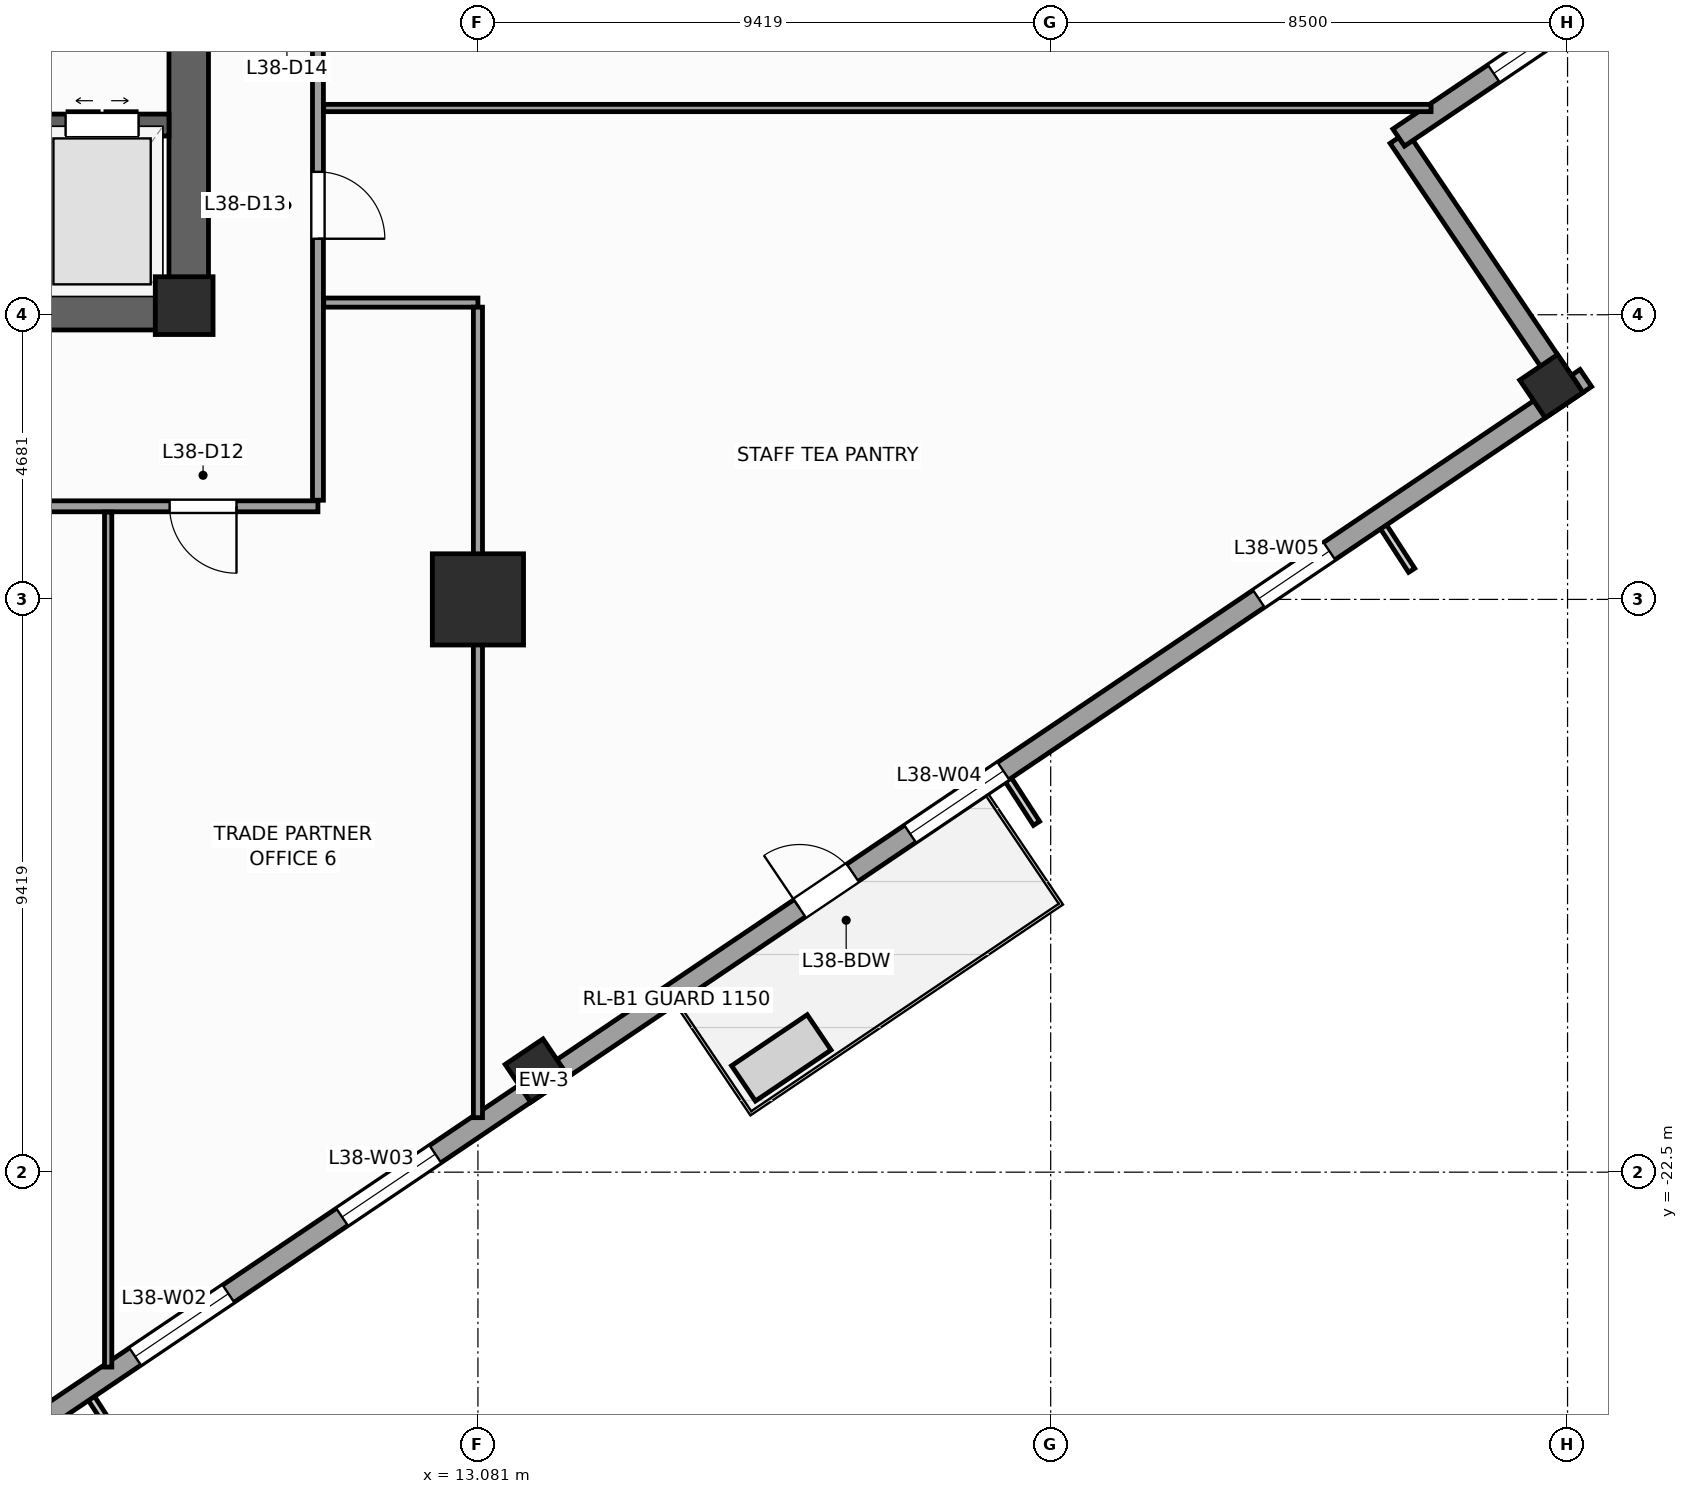
"""IFC4 building model, lengths in metres.
Left out: names, types, materials, properties, quantities, classifications, styles, units other than length and angle.
Written with IfcOpenShell. Run it as: python <this file> out.ifc"""

import sys

from ifc_helpers import new_model, si_unit, direction, frame, frame_2d, origin, origin_2d, place, context, subcontext, project, spatial, rectangle, extrude, source, transform, mapped, element, fill, save


model = new_model("IFC4")
c1 = context("Model", 3, precision=1e-05, world=origin(), true_north=direction((0.0, 1.0)))
c2 = subcontext(c1, "Body", "Model", "MODEL_VIEW")
j1 = project(units=[si_unit("LENGTHUNIT", "METRE"), si_unit("PLANEANGLEUNIT", "RADIAN")], contexts=[c1])
p1 = place(None, origin())
s1 = spatial("IfcSite", under=j1, at=p1, CompositionType="ELEMENT")
p2 = place(p1, origin())
s2 = spatial("IfcBuilding", under=s1, at=p2, CompositionType="ELEMENT")
p3 = place(p2, frame((0.0, 0.0, 160.4)))
s3 = spatial("IfcBuildingStorey", under=s2, at=p3, CompositionType="ELEMENT", Elevation=160.4)
p4 = place(p3, frame((-8.65, -8.325, 0.0), z_axis=(0.0, 0.0, 1.0), x_axis=(1.0, 0.0, 0.0)))
e1 = element("IfcWall", 1, at=p4, inside=s3, PredefinedType="SHEAR", context=c2, shape_type="SweptSolid", body=[
    extrude(rectangle(XDim=17.3, YDim=0.65, at=frame_2d((8.65, 0.0))), origin(), (0.0, 0.0, 1.0), 4.0),
])
p5 = place(p4, frame((8.0, 0.0, 0.0)))
e2 = element("IfcOpeningElement", 2, at=p5, cuts=e1, PredefinedType="OPENING", context=c2, shape_type="SweptSolid", body=[
    extrude(rectangle(XDim=1.3, YDim=2.2, at=frame_2d((0.65, 1.1))), frame((0.0, 0.335, 0.0), z_axis=(0.0, -1.0, 0.0), x_axis=(1.0, 0.0, 0.0)), (0.0, 0.0, 1.0), 0.67),
])
p6 = place(p3, frame((8.325, -8.0, 0.0), z_axis=(0.0, 0.0, 1.0), x_axis=(0.0, 1.0, 0.0)))
e3 = element("IfcWall", 3, at=p6, inside=s3, PredefinedType="SHEAR", context=c2, shape_type="SweptSolid", body=[
    extrude(rectangle(XDim=16.0, YDim=0.65, at=frame_2d((8.0, 0.0))), origin(), (0.0, 0.0, 1.0), 4.0),
])
p7 = place(p6, frame((4.69, 0.0, 0.0)))
e4 = element("IfcOpeningElement", 4, at=p7, cuts=e3, PredefinedType="OPENING", context=c2, shape_type="SweptSolid", body=[
    extrude(rectangle(XDim=1.3, YDim=2.2, at=frame_2d((0.65, 1.1))), frame((0.0, 0.335, 0.0), z_axis=(0.0, -1.0, 0.0), x_axis=(1.0, 0.0, 0.0)), (0.0, 0.0, 1.0), 0.67),
])
p8 = place(p3, frame((4.54, -5.28, 0.0), z_axis=(0.0, 0.0, 1.0), x_axis=(1.0, 0.0, 0.0)))
e5 = element("IfcWall", 5, at=p8, inside=s3, PredefinedType="SHEAR", context=c2, shape_type="SweptSolid", body=[
    extrude(rectangle(XDim=3.46, YDim=0.36, at=frame_2d((1.73, 0.0))), origin(), (0.0, 0.0, 1.0), 4.0),
])
p9 = place(p8, frame((1.76, 0.0, 0.0)))
e6 = element("IfcOpeningElement", 6, at=p9, cuts=e5, PredefinedType="OPENING", context=c2, shape_type="SweptSolid", body=[
    extrude(rectangle(XDim=1.2, YDim=2.25, at=frame_2d((0.6, 1.125))), frame((0.0, 0.19, 0.0), z_axis=(0.0, -1.0, 0.0), x_axis=(1.0, 0.0, 0.0)), (0.0, 0.0, 1.0), 0.38),
])
m1 = source(origin(), c2, "Body", "SweptSolid", [
    extrude(rectangle(XDim=0.95, YDim=0.95, at=origin_2d()), origin(), (0.0, 0.0, 1.0), 4.0),
])
p10 = place(p3, frame((8.25, -8.25, 0.0), z_axis=(0.0, 0.0, 1.0), x_axis=(1.0, 0.0, 0.0)))
e7 = element("IfcColumn", 7, at=p10, inside=s3, PredefinedType="PILASTER", context=c2, shape_type="MappedRepresentation", body=[
    mapped(m1, transform((0.0, 0.0, 0.0), scale=1.0)),
])
m2 = source(origin(), c2, "Body", "SweptSolid", [
    extrude(rectangle(XDim=1.5, YDim=1.5, at=origin_2d()), origin(), (0.0, 0.0, 1.0), 4.0),
])
p11 = place(p3, frame((13.081, -13.081, 0.0), z_axis=(0.0, 0.0, 1.0), x_axis=(1.0, 0.0, 0.0)))
e8 = element("IfcColumn", 8, at=p11, inside=s3, PredefinedType="COLUMN", context=c2, shape_type="MappedRepresentation", body=[
    mapped(m2, transform((0.0, 0.0, 0.0), scale=1.0)),
])
m3 = source(origin(), c2, "Body", "SweptSolid", [
    extrude(rectangle(XDim=0.75, YDim=0.75, at=origin_2d()), origin(), (0.0, 0.0, 1.0), 4.0),
])
for number, where, z_axis, x_axis in (
    (9, (14.05, -20.83, 0.0), (0.0, 0.0, 1.0), (0.829, 0.559, 0.0)),
    (10, (30.734, -9.576, 0.0), (0.0, 0.0, 1.0), (0.829, 0.559, 0.0)),
):
    element("IfcColumn", number, at=place(p3, frame(where, z_axis=z_axis, x_axis=x_axis)), inside=s3, PredefinedType="COLUMN", context=c2, shape_type="MappedRepresentation", body=[
        mapped(m3, transform((0.0, 0.0, 0.0), scale=1.0)),
    ])
p12 = place(p3, frame((-2.972, -32.558, 0.0), z_axis=(0.0, 0.0, 1.0), x_axis=(0.829036218961, 0.559194910251, 0.0)))
e11 = element("IfcWall", 11, at=p12, inside=s3, PredefinedType="STANDARD", context=c2, shape_type="SweptSolid", body=[
    extrude(rectangle(XDim=41.34, YDim=0.34, at=frame_2d((20.67, 0.0))), origin(), (0.0, 0.0, 1.0), 3.04),
])
p13 = place(p12, frame((25.745, 0.0, 0.0)))
e12 = element("IfcOpeningElement", 12, at=p13, cuts=e11, PredefinedType="OPENING", context=c2, shape_type="SweptSolid", body=[
    extrude(rectangle(XDim=1.05, YDim=2.25, at=frame_2d((0.525, 1.125))), frame((0.0, 0.18, 0.0), z_axis=(0.0, -1.0, 0.0), x_axis=(1.0, 0.0, 0.0)), (0.0, 0.0, 1.0), 0.36),
])
p14 = place(p12, frame((4.261, 0.0, 0.56)))
e13 = element("IfcOpeningElement", 13, at=p14, cuts=e11, PredefinedType="OPENING", context=c2, shape_type="SweptSolid", body=[
    extrude(rectangle(XDim=1.4, YDim=2.4, at=frame_2d((0.7, 1.2))), frame((0.0, 0.18, 0.0), z_axis=(0.0, -1.0, 0.0), x_axis=(1.0, 0.0, 0.0)), (0.0, 0.0, 1.0), 0.36),
])
p15 = place(p12, frame((12.564, 0.0, 0.61)))
e14 = element("IfcOpeningElement", 14, at=p15, cuts=e11, PredefinedType="OPENING", context=c2, shape_type="SweptSolid", body=[
    extrude(rectangle(XDim=1.85, YDim=2.35, at=frame_2d((0.925, 1.175))), frame((0.0, 0.18, 0.0), z_axis=(0.0, -1.0, 0.0), x_axis=(1.0, 0.0, 0.0)), (0.0, 0.0, 1.0), 0.36),
])
p16 = place(p12, frame((16.668, 0.0, 0.61)))
e15 = element("IfcOpeningElement", 15, at=p16, cuts=e11, PredefinedType="OPENING", context=c2, shape_type="SweptSolid", body=[
    extrude(rectangle(XDim=1.85, YDim=2.35, at=frame_2d((0.925, 1.175))), frame((0.0, 0.18, 0.0), z_axis=(0.0, -1.0, 0.0), x_axis=(1.0, 0.0, 0.0)), (0.0, 0.0, 1.0), 0.36),
])
p17 = place(p12, frame((27.936, 0.0, 0.61)))
e16 = element("IfcOpeningElement", 16, at=p17, cuts=e11, PredefinedType="OPENING", context=c2, shape_type="SweptSolid", body=[
    extrude(rectangle(XDim=1.85, YDim=2.35, at=frame_2d((0.925, 1.175))), frame((0.0, 0.18, 0.0), z_axis=(0.0, -1.0, 0.0), x_axis=(1.0, 0.0, 0.0)), (0.0, 0.0, 1.0), 0.36),
])
p18 = place(p12, frame((34.852, 0.0, 0.56)))
e17 = element("IfcOpeningElement", 17, at=p18, cuts=e11, PredefinedType="OPENING", context=c2, shape_type="SweptSolid", body=[
    extrude(rectangle(XDim=1.4, YDim=2.4, at=frame_2d((0.7, 1.2))), frame((0.0, 0.18, 0.0), z_axis=(0.0, -1.0, 0.0), x_axis=(1.0, 0.0, 0.0)), (0.0, 0.0, 1.0), 0.36),
])
p19 = place(p3, frame((31.019, -9.631, 0.0), z_axis=(0.0, 0.0, 1.0), x_axis=(-0.559210350234, 0.829025804298, 0.0)))
e18 = element("IfcWall", 18, at=p19, inside=s3, PredefinedType="STANDARD", context=c2, shape_type="SweptSolid", body=[
    extrude(rectangle(XDim=5.0, YDim=0.34, at=frame_2d((2.5, 0.0))), origin(), (0.0, 0.0, 1.0), 3.74),
])
p20 = place(p3, frame((28.223, -5.486, 0.0), z_axis=(0.0, 0.0, 1.0), x_axis=(0.82905227345, 0.559171107879, 0.0)))
e19 = element("IfcWall", 19, at=p20, inside=s3, PredefinedType="STANDARD", context=c2, shape_type="SweptSolid", body=[
    extrude(rectangle(XDim=5.17, YDim=0.34, at=frame_2d((2.585, 0.0))), origin(), (0.0, 0.0, 1.0), 3.04),
])
p21 = place(p20, frame((1.885, 0.0, 0.56)))
e20 = element("IfcOpeningElement", 20, at=p21, cuts=e19, PredefinedType="OPENING", context=c2, shape_type="SweptSolid", body=[
    extrude(rectangle(XDim=1.4, YDim=2.4, at=frame_2d((0.7, 1.2))), frame((0.0, 0.18, 0.0), z_axis=(0.0, -1.0, 0.0), x_axis=(1.0, 0.0, 0.0)), (0.0, 0.0, 1.0), 0.36),
])
p22 = place(p3, frame((-11.55, -11.55, 0.0), z_axis=(0.0, 0.0, 1.0), x_axis=(1.0, 0.0, 0.0)))
e21 = element("IfcWall", 21, at=p22, inside=s3, PredefinedType="PARTITIONING", context=c2, shape_type="SweptSolid", body=[
    extrude(rectangle(XDim=22.0, YDim=0.18, at=frame_2d((11.0, 0.0))), origin(), (0.0, 0.0, 1.0), 3.74),
])
p23 = place(p22, frame((1.58, 0.0, 0.0)))
e22 = element("IfcOpeningElement", 22, at=p23, cuts=e21, PredefinedType="OPENING", context=c2, shape_type="SweptSolid", body=[
    extrude(rectangle(XDim=0.95, YDim=2.1, at=frame_2d((0.475, 1.05))), frame((0.0, 0.1, 0.0), z_axis=(0.0, -1.0, 0.0), x_axis=(1.0, 0.0, 0.0)), (0.0, 0.0, 1.0), 0.2),
])
p24 = place(p22, frame((6.75, 0.0, 0.0)))
e23 = element("IfcOpeningElement", 23, at=p24, cuts=e21, PredefinedType="OPENING", context=c2, shape_type="SweptSolid", body=[
    extrude(rectangle(XDim=1.1, YDim=2.2, at=frame_2d((0.55, 1.1))), frame((0.0, 0.1, 0.0), z_axis=(0.0, -1.0, 0.0), x_axis=(1.0, 0.0, 0.0)), (0.0, 0.0, 1.0), 0.2),
])
p25 = place(p22, frame((11.25, 0.0, 0.0)))
e24 = element("IfcOpeningElement", 24, at=p25, cuts=e21, PredefinedType="OPENING", context=c2, shape_type="SweptSolid", body=[
    extrude(rectangle(XDim=1.1, YDim=2.2, at=frame_2d((0.55, 1.1))), frame((0.0, 0.1, 0.0), z_axis=(0.0, -1.0, 0.0), x_axis=(1.0, 0.0, 0.0)), (0.0, 0.0, 1.0), 0.2),
])
p26 = place(p22, frame((15.75, 0.0, 0.0)))
e25 = element("IfcOpeningElement", 25, at=p26, cuts=e21, PredefinedType="OPENING", context=c2, shape_type="SweptSolid", body=[
    extrude(rectangle(XDim=1.1, YDim=2.2, at=frame_2d((0.55, 1.1))), frame((0.0, 0.1, 0.0), z_axis=(0.0, -1.0, 0.0), x_axis=(1.0, 0.0, 0.0)), (0.0, 0.0, 1.0), 0.2),
])
p27 = place(p22, frame((19.561, 0.0, 0.0)))
e26 = element("IfcOpeningElement", 26, at=p27, cuts=e21, PredefinedType="OPENING", context=c2, shape_type="SweptSolid", body=[
    extrude(rectangle(XDim=1.1, YDim=2.2, at=frame_2d((0.55, 1.1))), frame((0.0, 0.1, 0.0), z_axis=(0.0, -1.0, 0.0), x_axis=(1.0, 0.0, 0.0)), (0.0, 0.0, 1.0), 0.2),
])
p28 = place(p3, frame((10.45, -11.45, 0.0), z_axis=(0.0, 0.0, 1.0), x_axis=(0.0, 1.0, 0.0)))
e27 = element("IfcWall", 27, at=p28, inside=s3, PredefinedType="PARTITIONING", context=c2, shape_type="SweptSolid", body=[
    extrude(rectangle(XDim=10.05, YDim=0.18, at=frame_2d((5.025, 0.0))), origin(), (0.0, 0.0, 1.0), 3.74),
])
p29 = place(p28, frame((4.3, 0.0, 0.0)))
e28 = element("IfcOpeningElement", 28, at=p29, cuts=e27, PredefinedType="OPENING", context=c2, shape_type="SweptSolid", body=[
    extrude(rectangle(XDim=1.1, YDim=2.2, at=frame_2d((0.55, 1.1))), frame((0.0, 0.1, 0.0), z_axis=(0.0, -1.0, 0.0), x_axis=(1.0, 0.0, 0.0)), (0.0, 0.0, 1.0), 0.2),
])
p30 = place(p28, frame((7.536, 0.0, 0.0)))
e29 = element("IfcOpeningElement", 29, at=p30, cuts=e27, PredefinedType="OPENING", context=c2, shape_type="SweptSolid", body=[
    extrude(rectangle(XDim=1.1, YDim=2.2, at=frame_2d((0.55, 1.1))), frame((0.0, 0.1, 0.0), z_axis=(0.0, -1.0, 0.0), x_axis=(1.0, 0.0, 0.0)), (0.0, 0.0, 1.0), 0.2),
])
p31 = place(p3, frame((7.0, -25.705, 0.0), z_axis=(0.0, 0.0, 1.0), x_axis=(0.0, 1.0, 0.0)))
e30 = element("IfcWall", 30, at=p31, inside=s3, PredefinedType="PARTITIONING", context=c2, shape_type="SweptSolid", body=[
    extrude(rectangle(XDim=14.06, YDim=0.12, at=frame_2d((7.03, 0.0))), origin(), (0.0, 0.0, 1.0), 3.74),
])
p32 = place(p3, frame((10.545, -8.2, 0.0), z_axis=(0.0, 0.0, 1.0), x_axis=(1.0, 0.0, 0.0)))
e31 = element("IfcWall", 31, at=p32, inside=s3, PredefinedType="PARTITIONING", context=c2, shape_type="SweptSolid", body=[
    extrude(rectangle(XDim=2.536, YDim=0.15, at=frame_2d((1.268, 0.0))), origin(), (0.0, 0.0, 1.0), 3.74),
])
p33 = place(p3, frame((13.081, -8.275, 0.0), z_axis=(0.0, 0.0, 1.0), x_axis=(0.0, -1.0, 0.0)))
e32 = element("IfcWall", 32, at=p33, inside=s3, PredefinedType="PARTITIONING", context=c2, shape_type="SweptSolid", body=[
    extrude(rectangle(XDim=13.329, YDim=0.15, at=frame_2d((6.664, 0.0))), origin(), (0.0, 0.0, 1.0), 2.84),
])
p34 = place(p3, frame((10.545, -5.0, 0.0), z_axis=(0.0, 0.0, 1.0), x_axis=(1.0, 0.0, 0.0)))
e33 = element("IfcWall", 33, at=p34, inside=s3, PredefinedType="PARTITIONING", context=c2, shape_type="SweptSolid", body=[
    extrude(rectangle(XDim=18.21, YDim=0.12, at=frame_2d((9.105, 0.0))), origin(), (0.0, 0.0, 1.0), 3.74),
])
m4 = source(origin(), c2, "Body", "SweptSolid", [
    extrude(rectangle(XDim=1.05, YDim=2.25, at=frame_2d((0.525, 1.125))), frame((0.0, 0.025, 0.0), z_axis=(0.0, -1.0, 0.0), x_axis=(1.0, 0.0, 0.0)), (0.0, 0.0, 1.0), 0.05),
])
p35 = place(p13, origin())
e34 = element("IfcDoor", 34, at=p35, inside=s3, OperationType="SINGLE_SWING_LEFT", PredefinedType="DOOR", context=c2, shape_type="MappedRepresentation", body=[
    mapped(m4, transform((0.0, 0.0, 0.0), scale=1.0)),
])
fill(e12, e34)
m5 = source(origin(), c2, "Body", "SweptSolid", [
    extrude(rectangle(XDim=1.85, YDim=2.35, at=frame_2d((0.925, 1.175))), frame((0.0, 0.03, 0.0), z_axis=(0.0, -1.0, 0.0), x_axis=(1.0, 0.0, 0.0)), (0.0, 0.0, 1.0), 0.06),
])
p36 = place(p15, origin())
e35 = element("IfcWindow", 35, at=p36, inside=s3, PartitioningType="SINGLE_PANEL", PredefinedType="WINDOW", context=c2, shape_type="MappedRepresentation", body=[
    mapped(m5, transform((0.0, 0.0, 0.0), scale=1.0)),
])
fill(e14, e35)
p37 = place(p16, origin())
e36 = element("IfcWindow", 36, at=p37, inside=s3, PartitioningType="SINGLE_PANEL", PredefinedType="WINDOW", context=c2, shape_type="MappedRepresentation", body=[
    mapped(m5, transform((0.0, 0.0, 0.0), scale=1.0)),
])
fill(e15, e36)
p38 = place(p17, origin())
e37 = element("IfcWindow", 37, at=p38, inside=s3, PartitioningType="SINGLE_PANEL", PredefinedType="WINDOW", context=c2, shape_type="MappedRepresentation", body=[
    mapped(m5, transform((0.0, 0.0, 0.0), scale=1.0)),
])
fill(e16, e37)
m6 = source(origin(), c2, "Body", "SweptSolid", [
    extrude(rectangle(XDim=1.4, YDim=2.4, at=frame_2d((0.7, 1.2))), frame((0.0, 0.03, 0.0), z_axis=(0.0, -1.0, 0.0), x_axis=(1.0, 0.0, 0.0)), (0.0, 0.0, 1.0), 0.06),
])
p39 = place(p18, origin())
e38 = element("IfcWindow", 38, at=p39, inside=s3, PartitioningType="SINGLE_PANEL", PredefinedType="WINDOW", context=c2, shape_type="MappedRepresentation", body=[
    mapped(m6, transform((0.0, 0.0, 0.0), scale=1.0)),
])
fill(e17, e38)
p40 = place(p21, origin())
e39 = element("IfcWindow", 39, at=p40, inside=s3, PartitioningType="SINGLE_PANEL", PredefinedType="WINDOW", context=c2, shape_type="MappedRepresentation", body=[
    mapped(m6, transform((0.0, 0.0, 0.0), scale=1.0)),
])
fill(e20, e39)
m7 = source(origin(), c2, "Body", "SweptSolid", [
    extrude(rectangle(XDim=1.2, YDim=2.25, at=frame_2d((0.6, 1.125))), frame((0.0, 0.025, 0.0), z_axis=(0.0, -1.0, 0.0), x_axis=(1.0, 0.0, 0.0)), (0.0, 0.0, 1.0), 0.05),
])
p41 = place(p9, origin())
e40 = element("IfcDoor", 40, at=p41, inside=s3, OperationType="DOUBLE_DOOR_SLIDING", PredefinedType="DOOR", context=c2, shape_type="MappedRepresentation", body=[
    mapped(m7, transform((0.0, 0.0, 0.0), scale=1.0)),
])
fill(e6, e40)
m8 = source(origin(), c2, "Body", "SweptSolid", [
    extrude(rectangle(XDim=1.1, YDim=2.2, at=frame_2d((0.55, 1.1))), frame((0.0, 0.025, 0.0), z_axis=(0.0, -1.0, 0.0), x_axis=(1.0, 0.0, 0.0)), (0.0, 0.0, 1.0), 0.05),
])
p42 = place(p27, frame((1.1, 0.0, 0.0), z_axis=(0.0, 0.0, 1.0), x_axis=(-1.0, 0.0, 0.0)))
e41 = element("IfcDoor", 41, at=p42, inside=s3, OperationType="SINGLE_SWING_RIGHT", PredefinedType="DOOR", context=c2, shape_type="MappedRepresentation", body=[
    mapped(m8, transform((0.0, 0.0, 0.0), scale=1.0)),
])
fill(e26, e41)
p43 = place(p29, frame((1.1, 0.0, 0.0), z_axis=(0.0, 0.0, 1.0), x_axis=(-1.0, 0.0, 0.0)))
e42 = element("IfcDoor", 42, at=p43, inside=s3, OperationType="SINGLE_SWING_LEFT", PredefinedType="DOOR", context=c2, shape_type="MappedRepresentation", body=[
    mapped(m8, transform((0.0, 0.0, 0.0), scale=1.0)),
])
fill(e28, e42)
save(model, sys.argv[1])
